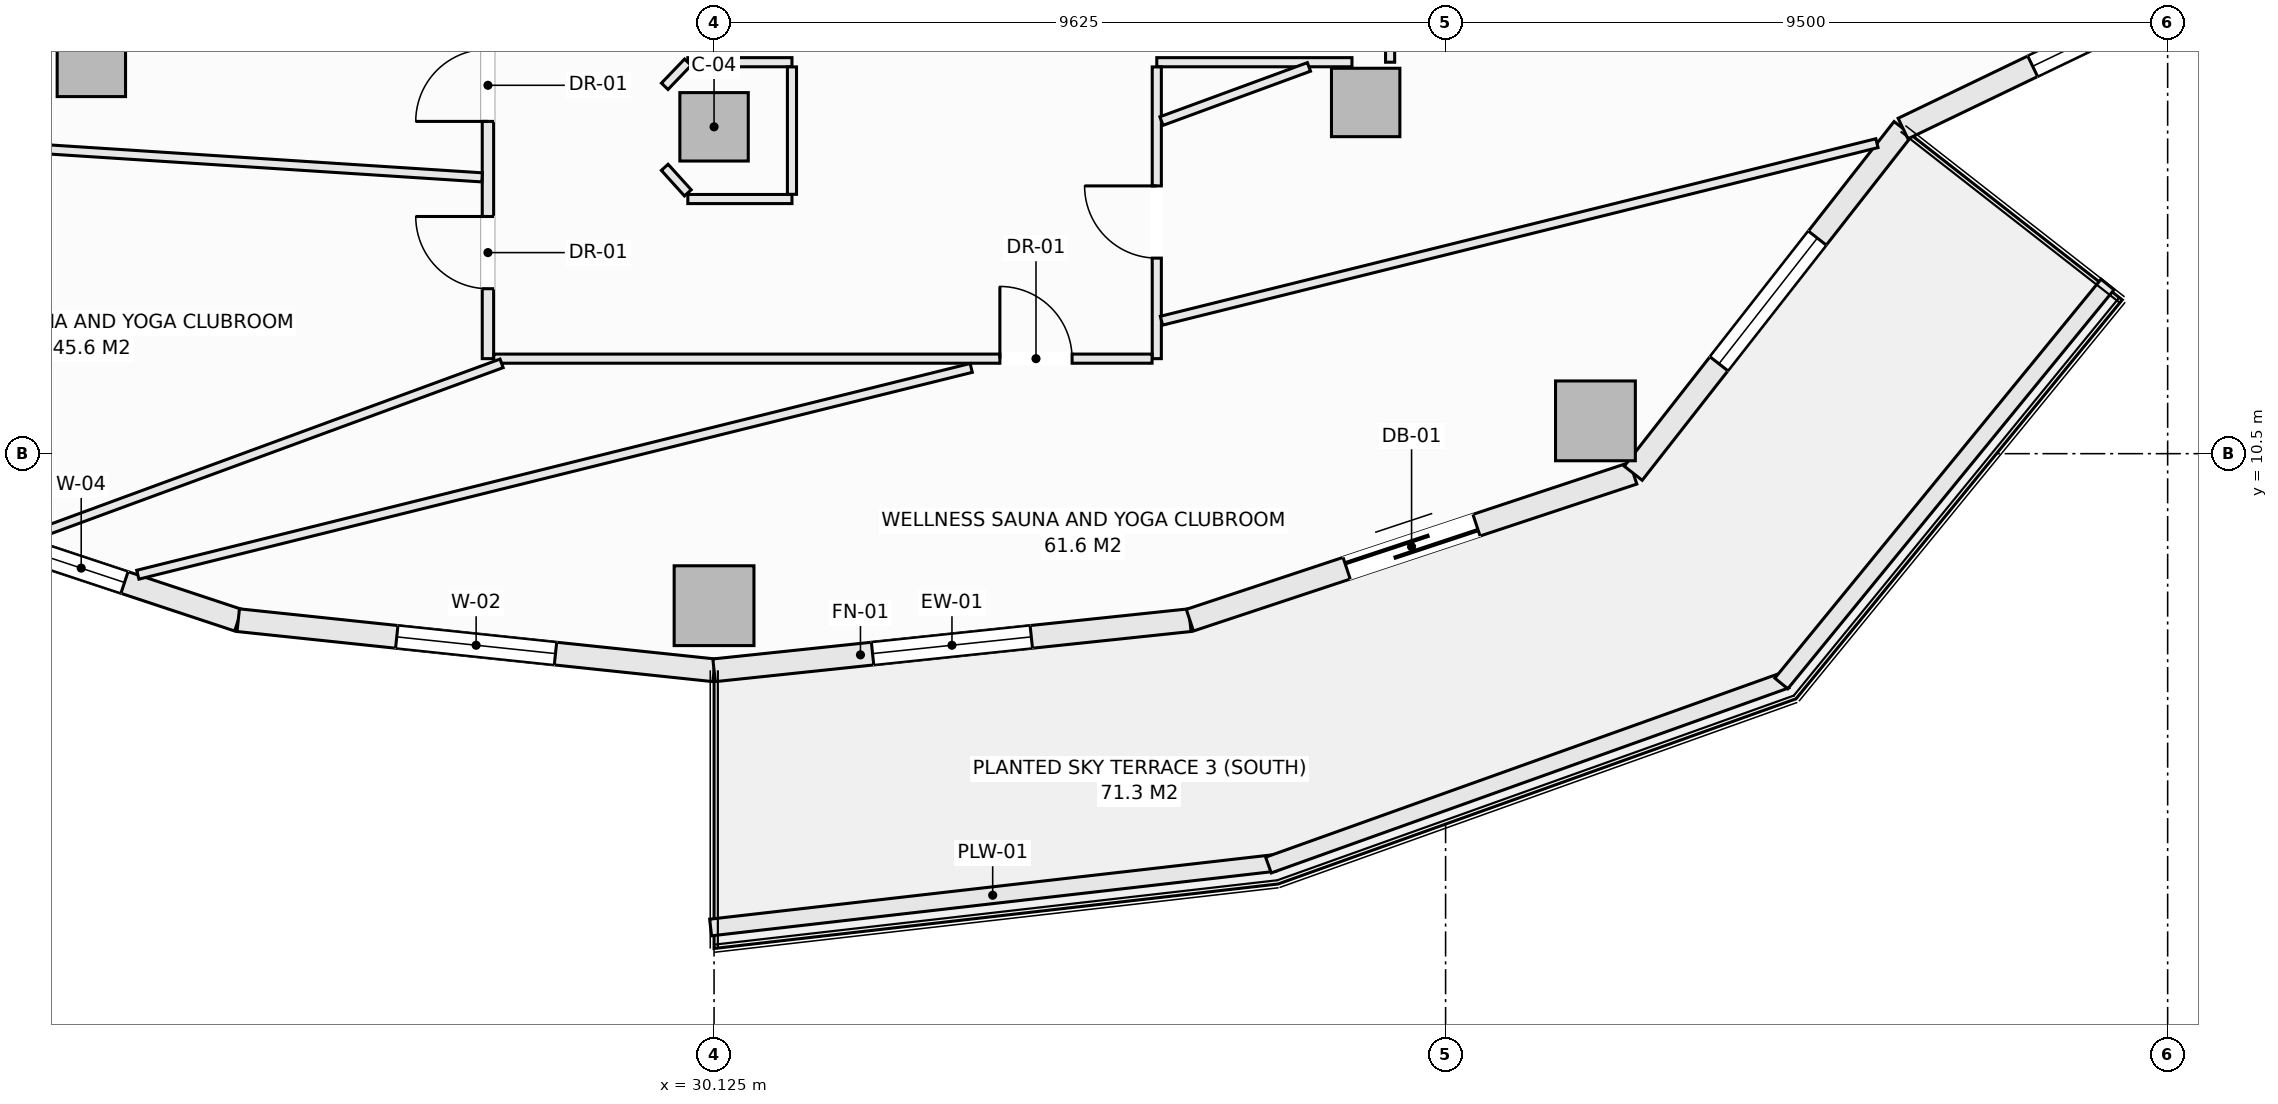
"""IFC4 building model, lengths in metres.
Left out: names, types, materials, properties, quantities, classifications, styles, units other than length and angle.
Written with IfcOpenShell. Run it as: python <this file> out.ifc"""

import sys

from ifc_helpers import new_model, si_unit, direction, frame, frame_2d, origin, origin_2d, place, context, subcontext, project, spatial, rectangle, extrude, element, fill, save


model = new_model("IFC4")
c1 = context("Model", 3, precision=1e-05, world=origin(), true_north=direction((0.0, 1.0)))
c2 = subcontext(c1, "Body", "Model", "MODEL_VIEW")
j1 = project(units=[si_unit("LENGTHUNIT", "METRE"), si_unit("PLANEANGLEUNIT", "RADIAN")], contexts=[c1])
p1 = place(None, origin())
s1 = spatial("IfcSite", under=j1, at=p1, CompositionType="ELEMENT")
p2 = place(p1, origin())
s2 = spatial("IfcBuilding", under=s1, at=p2, CompositionType="ELEMENT")
p3 = place(p2, frame((0.0, 0.0, 132.5)))
s3 = spatial("IfcBuildingStorey", under=s2, at=p3, CompositionType="ELEMENT", Elevation=132.5)
for number, where, z_axis, x_axis in (
    (1, (30.125, 8.5, -0.27), (0.0, 0.0, 1.0), (1.0, 0.0, 0.0)),
    (2, (41.721, 10.932, -0.27), (0.0, 0.0, 1.0), (1.0, 0.0, 0.0)),
):
    element("IfcColumn", number, at=place(p3, frame(where, z_axis=z_axis, x_axis=x_axis)), inside=s3, PredefinedType="COLUMN", context=c2, shape_type="SweptSolid", body=[
        extrude(rectangle(XDim=1.05, YDim=1.05, at=origin_2d()), origin(), (0.0, 0.0, 1.0), 3.4),
    ])
for number, where, z_axis, x_axis in (
    (3, (21.932, 15.648, -0.27), (0.0, 0.0, 1.0), (1.0, 0.0, 0.0)),
    (4, (30.125, 14.8, -0.27), (0.0, 0.0, 1.0), (1.0, 0.0, 0.0)),
    (5, (38.698, 15.121, -0.27), (0.0, 0.0, 1.0), (1.0, 0.0, 0.0)),
):
    element("IfcColumn", number, at=place(p3, frame(where, z_axis=z_axis, x_axis=x_axis)), inside=s3, PredefinedType="COLUMN", context=c2, shape_type="SweptSolid", body=[
        extrude(rectangle(XDim=0.9, YDim=0.9, at=origin_2d()), origin(), (0.0, 0.0, 1.0), 3.4),
    ])
p4 = place(p3, frame((18.031, 10.242, 0.0), z_axis=(0.0, 0.0, 1.0), x_axis=(0.949238009374, -0.314558741032, 0.0)))
e6 = element("IfcWall", 6, at=p4, inside=s3, PredefinedType="SOLIDWALL", context=c2, shape_type="SweptSolid", body=[
    extrude(rectangle(XDim=6.146, YDim=0.3, at=frame_2d((3.073, 0.0))), origin(), (0.0, 0.0, 1.0), 2.653),
])
p5 = place(p4, frame((1.83, 0.0, 0.74)))
e7 = element("IfcOpeningElement", 7, at=p5, cuts=e6, PredefinedType="OPENING", context=c2, shape_type="SweptSolid", body=[
    extrude(rectangle(XDim=1.2, YDim=1.7, at=frame_2d((0.6, 0.85))), frame((0.0, 0.16, 0.0), z_axis=(0.0, -1.0, 0.0), x_axis=(1.0, 0.0, 0.0)), (0.0, 0.0, 1.0), 0.32),
])
p6 = place(p4, frame((3.369, 0.0, 0.74)))
e8 = element("IfcOpeningElement", 8, at=p6, cuts=e6, PredefinedType="OPENING", context=c2, shape_type="SweptSolid", body=[
    extrude(rectangle(XDim=1.2, YDim=1.7, at=frame_2d((0.6, 0.85))), frame((0.0, 0.16, 0.0), z_axis=(0.0, -1.0, 0.0), x_axis=(1.0, 0.0, 0.0)), (0.0, 0.0, 1.0), 0.32),
])
p7 = place(p3, frame((23.865, 8.309, 0.0), z_axis=(0.0, 0.0, 1.0), x_axis=(0.994498012394, -0.104755445421, 0.0)))
e9 = element("IfcWall", 9, at=p7, inside=s3, PredefinedType="SOLIDWALL", context=c2, shape_type="SweptSolid", body=[
    extrude(rectangle(XDim=6.295, YDim=0.3, at=frame_2d((3.147, 0.0))), origin(), (0.0, 0.0, 1.0), 2.653),
])
p8 = place(p7, frame((2.097, 0.0, 0.74)))
e10 = element("IfcOpeningElement", 10, at=p8, cuts=e9, PredefinedType="OPENING", context=c2, shape_type="SweptSolid", body=[
    extrude(rectangle(XDim=2.1, YDim=1.7, at=frame_2d((1.05, 0.85))), frame((0.0, 0.16, 0.0), z_axis=(0.0, -1.0, 0.0), x_axis=(1.0, 0.0, 0.0)), (0.0, 0.0, 1.0), 0.32),
])
p9 = place(p3, frame((30.125, 7.65, 0.0), z_axis=(0.0, 0.0, 1.0), x_axis=(0.994498012394, 0.104755445421, 0.0)))
e11 = element("IfcWall", 11, at=p9, inside=s3, PredefinedType="SOLIDWALL", context=c2, shape_type="SweptSolid", body=[
    extrude(rectangle(XDim=6.295, YDim=0.3, at=frame_2d((3.147, 0.0))), origin(), (0.0, 0.0, 1.0), 2.653),
])
p10 = place(p9, frame((2.097, 0.0, 0.74)))
e12 = element("IfcOpeningElement", 12, at=p10, cuts=e11, PredefinedType="OPENING", context=c2, shape_type="SweptSolid", body=[
    extrude(rectangle(XDim=2.1, YDim=1.7, at=frame_2d((1.05, 0.85))), frame((0.0, 0.16, 0.0), z_axis=(0.0, -1.0, 0.0), x_axis=(1.0, 0.0, 0.0)), (0.0, 0.0, 1.0), 0.32),
])
p11 = place(p3, frame((36.385, 8.309, 0.0), z_axis=(0.0, 0.0, 1.0), x_axis=(0.949238009374, 0.314558741032, 0.0)))
e13 = element("IfcWall", 13, at=p11, inside=s3, PredefinedType="SOLIDWALL", context=c2, shape_type="SweptSolid", body=[
    extrude(rectangle(XDim=6.146, YDim=0.3, at=frame_2d((3.073, 0.0))), origin(), (0.0, 0.0, 1.0), 2.653),
])
p12 = place(p11, frame((2.173, 0.0, 0.0)))
e14 = element("IfcOpeningElement", 14, at=p12, cuts=e13, PredefinedType="OPENING", context=c2, shape_type="SweptSolid", body=[
    extrude(rectangle(XDim=1.8, YDim=2.25, at=frame_2d((0.9, 1.125))), frame((0.0, 0.16, 0.0), z_axis=(0.0, -1.0, 0.0), x_axis=(1.0, 0.0, 0.0)), (0.0, 0.0, 1.0), 0.32),
])
p13 = place(p3, frame((42.219, 10.242, 0.0), z_axis=(0.0, 0.0, 1.0), x_axis=(0.616435134162, 0.787405693001, 0.0)))
e15 = element("IfcWall", 15, at=p13, inside=s3, PredefinedType="SOLIDWALL", context=c2, shape_type="SweptSolid", body=[
    extrude(rectangle(XDim=5.759, YDim=0.3, at=frame_2d((2.879, 0.0))), origin(), (0.0, 0.0, 1.0), 2.653),
])
p14 = place(p13, frame((1.829, 0.0, 0.74)))
e16 = element("IfcOpeningElement", 16, at=p14, cuts=e15, PredefinedType="OPENING", context=c2, shape_type="SweptSolid", body=[
    extrude(rectangle(XDim=2.1, YDim=1.7, at=frame_2d((1.05, 0.85))), frame((0.0, 0.16, 0.0), z_axis=(0.0, -1.0, 0.0), x_axis=(1.0, 0.0, 0.0)), (0.0, 0.0, 1.0), 0.32),
])
p15 = place(p3, frame((45.769, 14.777, 0.0), z_axis=(0.0, 0.0, 1.0), x_axis=(0.901370184739, 0.433049408339, 0.0)))
e17 = element("IfcWall", 17, at=p15, inside=s3, PredefinedType="SOLIDWALL", context=c2, shape_type="SweptSolid", body=[
    extrude(rectangle(XDim=5.884, YDim=0.3, at=frame_2d((2.942, 0.0))), origin(), (0.0, 0.0, 1.0), 2.653),
])
p16 = place(p15, frame((1.892, 0.0, 0.74)))
e18 = element("IfcOpeningElement", 18, at=p16, cuts=e17, PredefinedType="OPENING", context=c2, shape_type="SweptSolid", body=[
    extrude(rectangle(XDim=2.1, YDim=1.7, at=frame_2d((1.05, 0.85))), frame((0.0, 0.16, 0.0), z_axis=(0.0, -1.0, 0.0), x_axis=(1.0, 0.0, 0.0)), (0.0, 0.0, 1.0), 0.32),
])
p17 = place(p3, frame((30.08, 4.266, 0.0), z_axis=(0.0, 0.0, 1.0), x_axis=(0.993527615836, 0.11359082961, 0.0)))
e19 = element("IfcWall", 19, at=p17, inside=s3, PredefinedType="PARAPET", context=c2, shape_type="SweptSolid", body=[
    extrude(rectangle(XDim=7.471, YDim=0.22, at=frame_2d((3.735, 0.0))), origin(), (0.0, 0.0, 1.0), 0.52),
])
p18 = place(p3, frame((37.419, 5.087, 0.0), z_axis=(0.0, 0.0, 1.0), x_axis=(0.941632697311, 0.336642040387, 0.0)))
e20 = element("IfcWall", 20, at=p18, inside=s3, PredefinedType="PARAPET", context=c2, shape_type="SweptSolid", body=[
    extrude(rectangle(XDim=7.236, YDim=0.22, at=frame_2d((3.618, 0.0))), origin(), (0.0, 0.0, 1.0), 0.52),
])
p19 = place(p3, frame((44.167, 7.477, 0.0), z_axis=(0.0, 0.0, 1.0), x_axis=(0.633002467947, 0.77414977593, 0.0)))
e21 = element("IfcWall", 21, at=p19, inside=s3, PredefinedType="PARAPET", context=c2, shape_type="SweptSolid", body=[
    extrude(rectangle(XDim=6.78, YDim=0.22, at=frame_2d((3.39, 0.0))), origin(), (0.0, 0.0, 1.0), 0.52),
])
p20 = place(p3, frame((27.15, 11.75, 0.0), z_axis=(0.0, 0.0, 1.0), x_axis=(0.0, 1.0, 0.0)))
e22 = element("IfcWall", 22, at=p20, inside=s3, PredefinedType="PARTITIONING", context=c2, shape_type="SweptSolid", body=[
    extrude(rectangle(XDim=5.223, YDim=0.15, at=frame_2d((2.611, 0.0))), origin(), (0.0, 0.0, 1.0), 3.13),
])
p21 = place(p20, frame((3.121, 0.0, 0.0)))
e23 = element("IfcOpeningElement", 23, at=p21, cuts=e22, PredefinedType="OPENING", context=c2, shape_type="SweptSolid", body=[
    extrude(rectangle(XDim=0.95, YDim=2.1, at=frame_2d((0.475, 1.05))), frame((0.0, 0.085, 0.0), z_axis=(0.0, -1.0, 0.0), x_axis=(1.0, 0.0, 0.0)), (0.0, 0.0, 1.0), 0.17),
])
p22 = place(p20, frame((0.92, 0.0, 0.0)))
e24 = element("IfcOpeningElement", 24, at=p22, cuts=e22, PredefinedType="OPENING", context=c2, shape_type="SweptSolid", body=[
    extrude(rectangle(XDim=0.95, YDim=2.1, at=frame_2d((0.475, 1.05))), frame((0.0, 0.085, 0.0), z_axis=(0.0, -1.0, 0.0), x_axis=(1.0, 0.0, 0.0)), (0.0, 0.0, 1.0), 0.17),
])
p23 = place(p3, frame((39.02, 15.65, 0.0), z_axis=(0.0, 0.0, 1.0), x_axis=(0.0, 1.0, 0.0)))
e25 = element("IfcWall", 25, at=p23, inside=s3, PredefinedType="PARTITIONING", context=c2, shape_type="SweptSolid", body=[
    extrude(rectangle(XDim=1.36, YDim=0.12, at=frame_2d((0.68, 0.0))), origin(), (0.0, 0.0, 1.0), 2.505),
])
p24 = place(p3, frame((29.78, 15.65, 0.0), z_axis=(0.0, 0.0, 1.0), x_axis=(1.0, 0.0, 0.0)))
e26 = element("IfcWall", 26, at=p24, inside=s3, PredefinedType="PARTITIONING", context=c2, shape_type="SweptSolid", body=[
    extrude(rectangle(XDim=1.37, YDim=0.12, at=frame_2d((0.685, 0.0))), origin(), (0.0, 0.0, 1.0), 3.13),
])
p25 = place(p3, frame((35.95, 15.65, 0.0), z_axis=(0.0, 0.0, 1.0), x_axis=(1.0, 0.0, 0.0)))
e27 = element("IfcWall", 27, at=p25, inside=s3, PredefinedType="PARTITIONING", context=c2, shape_type="SweptSolid", body=[
    extrude(rectangle(XDim=2.568, YDim=0.12, at=frame_2d((1.284, 0.0))), origin(), (0.0, 0.0, 1.0), 3.13),
])
p26 = place(p3, frame((35.95, 11.75, 0.0), z_axis=(0.0, 0.0, 1.0), x_axis=(0.0, 1.0, 0.0)))
e28 = element("IfcWall", 28, at=p26, inside=s3, PredefinedType="PARTITIONING", context=c2, shape_type="SweptSolid", body=[
    extrude(rectangle(XDim=3.838, YDim=0.12, at=frame_2d((1.919, 0.0))), origin(), (0.0, 0.0, 1.0), 3.13),
])
p27 = place(p26, frame((1.323, 0.0, 0.0)))
e29 = element("IfcOpeningElement", 29, at=p27, cuts=e28, PredefinedType="OPENING", context=c2, shape_type="SweptSolid", body=[
    extrude(rectangle(XDim=0.95, YDim=2.1, at=frame_2d((0.475, 1.05))), frame((0.0, 0.07, 0.0), z_axis=(0.0, -1.0, 0.0), x_axis=(1.0, 0.0, 0.0)), (0.0, 0.0, 1.0), 0.14),
])
p28 = place(p3, frame((27.227, 11.75, 0.0), z_axis=(0.0, 0.0, 1.0), x_axis=(1.0, 0.0, 0.0)))
e30 = element("IfcWall", 30, at=p28, inside=s3, PredefinedType="PARTITIONING", context=c2, shape_type="SweptSolid", body=[
    extrude(rectangle(XDim=8.661, YDim=0.12, at=frame_2d((4.331, 0.0))), origin(), (0.0, 0.0, 1.0), 3.13),
])
p29 = place(p28, frame((6.659, 0.0, 0.0)))
e31 = element("IfcOpeningElement", 31, at=p29, cuts=e30, PredefinedType="OPENING", context=c2, shape_type="SweptSolid", body=[
    extrude(rectangle(XDim=0.95, YDim=2.1, at=frame_2d((0.475, 1.05))), frame((0.0, 0.07, 0.0), z_axis=(0.0, -1.0, 0.0), x_axis=(1.0, 0.0, 0.0)), (0.0, 0.0, 1.0), 0.14),
])
p30 = place(p3, frame((29.476, 15.333, 0.0), z_axis=(0.0, 0.0, 1.0), x_axis=(0.692219273951, 0.721687243043, 0.0)))
e32 = element("IfcWall", 32, at=p30, inside=s3, PredefinedType="PARTITIONING", context=c2, shape_type="SweptSolid", body=[
    extrude(rectangle(XDim=0.439, YDim=0.12, at=frame_2d((0.22, 0.0))), origin(), (0.0, 0.0, 1.0), 3.13),
])
p31 = place(p3, frame((29.476, 14.267, 0.0), z_axis=(0.0, 0.0, 1.0), x_axis=(0.670659392016, -0.741765448037, 0.0)))
e33 = element("IfcWall", 33, at=p31, inside=s3, PredefinedType="PARTITIONING", context=c2, shape_type="SweptSolid", body=[
    extrude(rectangle(XDim=0.453, YDim=0.12, at=frame_2d((0.227, 0.0))), origin(), (0.0, 0.0, 1.0), 3.13),
])
p32 = place(p3, frame((29.78, 13.85, 0.0), z_axis=(0.0, 0.0, 1.0), x_axis=(1.0, 0.0, 0.0)))
e34 = element("IfcWall", 34, at=p32, inside=s3, PredefinedType="PARTITIONING", context=c2, shape_type="SweptSolid", body=[
    extrude(rectangle(XDim=1.37, YDim=0.12, at=frame_2d((0.685, 0.0))), origin(), (0.0, 0.0, 1.0), 3.13),
])
p33 = place(p3, frame((31.15, 13.912, 0.0), z_axis=(0.0, 0.0, 1.0), x_axis=(0.0, 1.0, 0.0)))
e35 = element("IfcWall", 35, at=p33, inside=s3, PredefinedType="PARTITIONING", context=c2, shape_type="SweptSolid", body=[
    extrude(rectangle(XDim=1.676, YDim=0.12, at=frame_2d((0.838, 0.0))), origin(), (0.0, 0.0, 1.0), 3.13),
])
p34 = place(p3, frame((14.479, 14.947, 0.0), z_axis=(0.0, 0.0, 1.0), x_axis=(0.997930277746, -0.064305215633, 0.0)))
e36 = element("IfcWall", 36, at=p34, inside=s3, PredefinedType="PARTITIONING", context=c2, shape_type="SweptSolid", body=[
    extrude(rectangle(XDim=12.62, YDim=0.12, at=frame_2d((6.31, 0.0))), origin(), (0.0, 0.0, 1.0), 2.812),
])
p35 = place(p3, frame((21.078, 9.393, 0.0), z_axis=(0.0, 0.0, 1.0), x_axis=(0.938728109135, 0.344658580511, 0.0)))
e37 = element("IfcWall", 37, at=p35, inside=s3, PredefinedType="PARTITIONING", context=c2, shape_type="SweptSolid", body=[
    extrude(rectangle(XDim=6.659, YDim=0.12, at=frame_2d((3.33, 0.0))), origin(), (0.0, 0.0, 1.0), 2.653),
])
p36 = place(p3, frame((36.012, 14.876, 0.0), z_axis=(0.0, 0.0, 1.0), x_axis=(0.938757901669, 0.344577425339, 0.0)))
e38 = element("IfcWall", 38, at=p36, inside=s3, PredefinedType="PARTITIONING", context=c2, shape_type="SweptSolid", body=[
    extrude(rectangle(XDim=2.067, YDim=0.12, at=frame_2d((1.033, 0.0))), origin(), (0.0, 0.0, 1.0), 2.505),
])
p37 = place(p3, frame((22.543, 8.907, 0.0), z_axis=(0.0, 0.0, 1.0), x_axis=(0.970574423873, 0.240801344938, 0.0)))
e39 = element("IfcWall", 39, at=p37, inside=s3, PredefinedType="PARTITIONING", context=c2, shape_type="SweptSolid", body=[
    extrude(rectangle(XDim=11.298, YDim=0.12, at=frame_2d((5.649, 0.0))), origin(), (0.0, 0.0, 1.0), 2.653),
])
p38 = place(p3, frame((36.012, 12.249, 0.0), z_axis=(0.0, 0.0, 1.0), x_axis=(0.970568919411, 0.24082353015, 0.0)))
e40 = element("IfcWall", 40, at=p38, inside=s3, PredefinedType="PARTITIONING", context=c2, shape_type="SweptSolid", body=[
    extrude(rectangle(XDim=9.699, YDim=0.12, at=frame_2d((4.849, 0.0))), origin(), (0.0, 0.0, 1.0), 3.13),
])
p39 = place(p8, origin())
e41 = element("IfcWindow", 41, at=p39, inside=s3, PartitioningType="SINGLE_PANEL", PredefinedType="WINDOW", context=c2, shape_type="SweptSolid", body=[
    extrude(rectangle(XDim=2.1, YDim=1.7, at=frame_2d((1.05, 0.85))), frame((0.0, 0.03, 0.0), z_axis=(0.0, -1.0, 0.0), x_axis=(1.0, 0.0, 0.0)), (0.0, 0.0, 1.0), 0.06),
])
fill(e10, e41)
p40 = place(p10, origin())
e42 = element("IfcWindow", 42, at=p40, inside=s3, PartitioningType="SINGLE_PANEL", PredefinedType="WINDOW", context=c2, shape_type="SweptSolid", body=[
    extrude(rectangle(XDim=2.1, YDim=1.7, at=frame_2d((1.05, 0.85))), frame((0.0, 0.03, 0.0), z_axis=(0.0, -1.0, 0.0), x_axis=(1.0, 0.0, 0.0)), (0.0, 0.0, 1.0), 0.06),
])
fill(e12, e42)
p41 = place(p12, frame((1.8, 0.0, 0.0), z_axis=(0.0, 0.0, 1.0), x_axis=(-1.0, 0.0, 0.0)))
e43 = element("IfcDoor", 43, at=p41, inside=s3, OperationType="SLIDING_TO_LEFT", PredefinedType="DOOR", context=c2, shape_type="SweptSolid", body=[
    extrude(rectangle(XDim=1.8, YDim=2.25, at=frame_2d((0.9, 1.125))), frame((0.0, 0.025, 0.0), z_axis=(0.0, -1.0, 0.0), x_axis=(1.0, 0.0, 0.0)), (0.0, 0.0, 1.0), 0.05),
])
fill(e14, e43)
p42 = place(p14, origin())
e44 = element("IfcWindow", 44, at=p42, inside=s3, PartitioningType="SINGLE_PANEL", PredefinedType="WINDOW", context=c2, shape_type="SweptSolid", body=[
    extrude(rectangle(XDim=2.1, YDim=1.7, at=frame_2d((1.05, 0.85))), frame((0.0, 0.03, 0.0), z_axis=(0.0, -1.0, 0.0), x_axis=(1.0, 0.0, 0.0)), (0.0, 0.0, 1.0), 0.06),
])
fill(e16, e44)
p43 = place(p16, origin())
e45 = element("IfcWindow", 45, at=p43, inside=s3, PartitioningType="SINGLE_PANEL", PredefinedType="WINDOW", context=c2, shape_type="SweptSolid", body=[
    extrude(rectangle(XDim=2.1, YDim=1.7, at=frame_2d((1.05, 0.85))), frame((0.0, 0.03, 0.0), z_axis=(0.0, -1.0, 0.0), x_axis=(1.0, 0.0, 0.0)), (0.0, 0.0, 1.0), 0.06),
])
fill(e18, e45)
p44 = place(p21, origin())
e46 = element("IfcDoor", 46, at=p44, inside=s3, OperationType="SINGLE_SWING_LEFT", PredefinedType="DOOR", context=c2, shape_type="SweptSolid", body=[
    extrude(rectangle(XDim=0.95, YDim=2.1, at=frame_2d((0.475, 1.05))), frame((0.0, 0.025, 0.0), z_axis=(0.0, -1.0, 0.0), x_axis=(1.0, 0.0, 0.0)), (0.0, 0.0, 1.0), 0.05),
])
fill(e23, e46)
p45 = place(p22, origin())
e47 = element("IfcDoor", 47, at=p45, inside=s3, OperationType="SINGLE_SWING_RIGHT", PredefinedType="DOOR", context=c2, shape_type="SweptSolid", body=[
    extrude(rectangle(XDim=0.95, YDim=2.1, at=frame_2d((0.475, 1.05))), frame((0.0, 0.025, 0.0), z_axis=(0.0, -1.0, 0.0), x_axis=(1.0, 0.0, 0.0)), (0.0, 0.0, 1.0), 0.05),
])
fill(e24, e47)
p46 = place(p29, origin())
e48 = element("IfcDoor", 48, at=p46, inside=s3, OperationType="SINGLE_SWING_LEFT", PredefinedType="DOOR", context=c2, shape_type="SweptSolid", body=[
    extrude(rectangle(XDim=0.95, YDim=2.1, at=frame_2d((0.475, 1.05))), frame((0.0, 0.025, 0.0), z_axis=(0.0, -1.0, 0.0), x_axis=(1.0, 0.0, 0.0)), (0.0, 0.0, 1.0), 0.05),
])
fill(e31, e48)
p47 = place(p27, origin())
e49 = element("IfcDoor", 49, at=p47, inside=s3, OperationType="SINGLE_SWING_RIGHT", PredefinedType="DOOR", context=c2, shape_type="SweptSolid", body=[
    extrude(rectangle(XDim=0.95, YDim=2.1, at=frame_2d((0.475, 1.05))), frame((0.0, 0.025, 0.0), z_axis=(0.0, -1.0, 0.0), x_axis=(1.0, 0.0, 0.0)), (0.0, 0.0, 1.0), 0.05),
])
fill(e29, e49)
p48 = place(p6, origin())
e50 = element("IfcWindow", 50, at=p48, inside=s3, PartitioningType="SINGLE_PANEL", PredefinedType="WINDOW", context=c2, shape_type="SweptSolid", body=[
    extrude(rectangle(XDim=1.2, YDim=1.7, at=frame_2d((0.6, 0.85))), frame((0.0, 0.03, 0.0), z_axis=(0.0, -1.0, 0.0), x_axis=(1.0, 0.0, 0.0)), (0.0, 0.0, 1.0), 0.06),
])
fill(e8, e50)
save(model, sys.argv[1])
